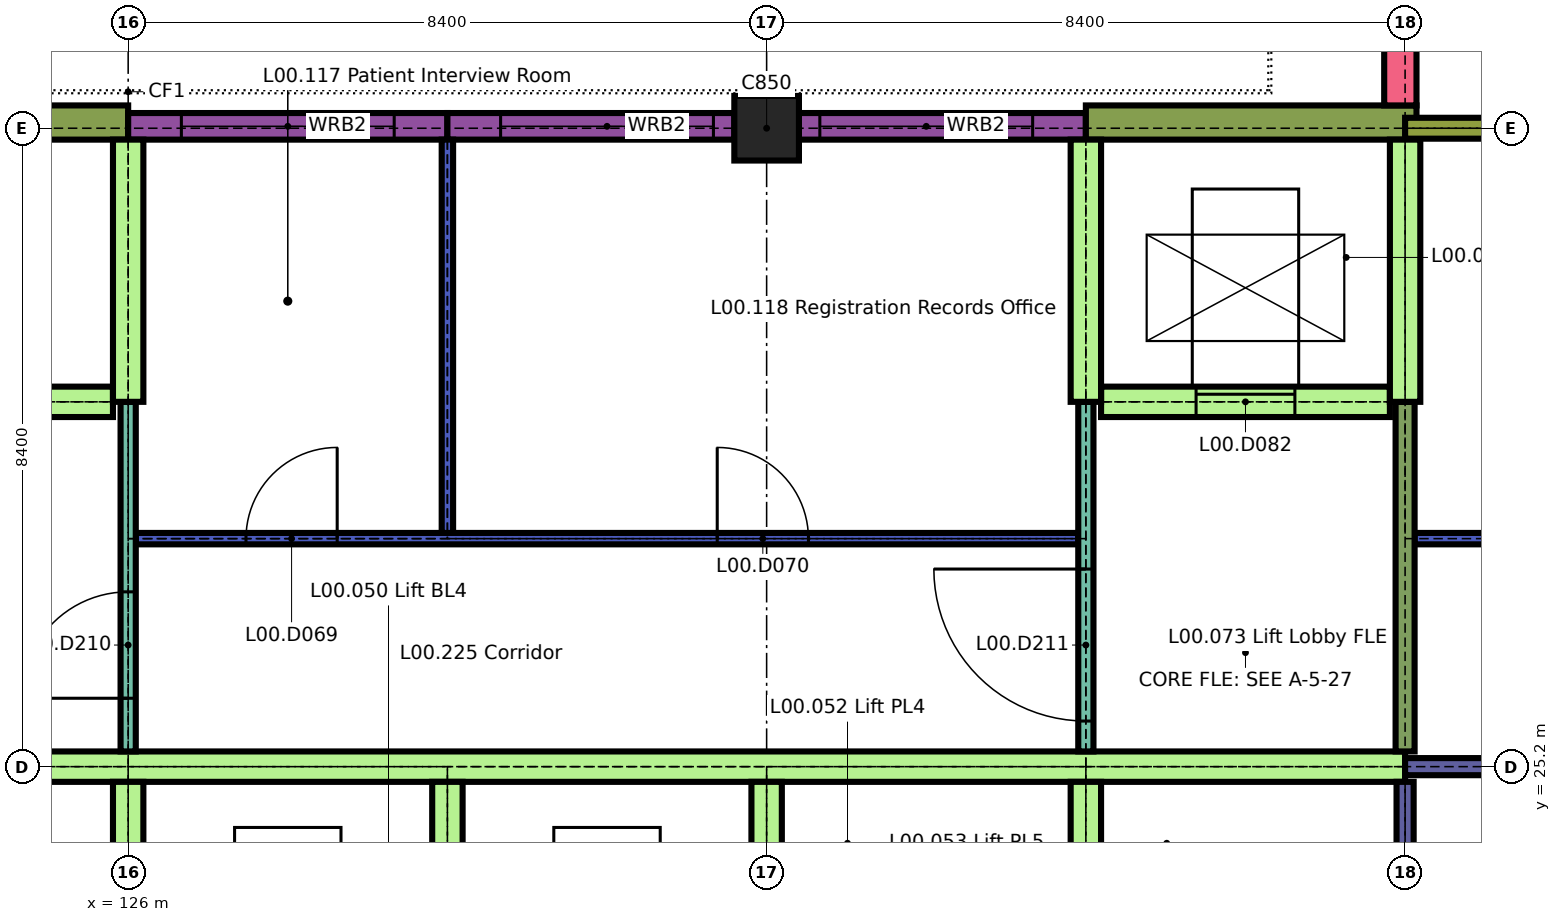
"""IFC4 building model, lengths in metres.
Left out: names, types, materials, properties, quantities, classifications, styles, units other than length and angle.
Written with IfcOpenShell. Run it as: python <this file> out.ifc"""

import sys

from ifc_helpers import new_model, si_unit, direction, frame, frame_2d, origin, origin_2d, place, context, subcontext, project, spatial, rectangle, extrude, element, fill, save


model = new_model("IFC4")
c1 = context("Model", 3, precision=1e-05, world=origin(), true_north=direction((0.0, 1.0)))
c2 = subcontext(c1, "Body", "Model", "MODEL_VIEW")
j1 = project(units=[si_unit("LENGTHUNIT", "METRE"), si_unit("PLANEANGLEUNIT", "RADIAN")], contexts=[c1])
p1 = place(None, origin())
s1 = spatial("IfcSite", under=j1, at=p1, CompositionType="ELEMENT")
p2 = place(p1, origin())
s2 = spatial("IfcBuilding", under=s1, at=p2, CompositionType="ELEMENT")
p3 = place(p2, origin())
s3 = spatial("IfcBuildingStorey", under=s2, at=p3, CompositionType="ELEMENT", Elevation=0.0)
p4 = place(p3, frame((134.4, 33.6, 0.0), z_axis=(0.0, 0.0, 1.0), x_axis=(1.0, 0.0, 0.0)))
e1 = element("IfcColumn", 1, at=p4, inside=s3, PredefinedType="COLUMN", context=c2, shape_type="SweptSolid", body=[
    extrude(rectangle(XDim=0.85, YDim=0.85, at=origin_2d()), origin(), (0.0, 0.0, 1.0), 4.14),
])
p5 = place(p3, frame((122.7, 33.675, 0.0), z_axis=(0.0, 0.0, 1.0), x_axis=(1.0, 0.0, 0.0)))
e2 = element("IfcWall", 2, at=p5, inside=s3, PredefinedType="SOLIDWALL", context=c2, shape_type="SweptSolid", body=[
    extrude(rectangle(XDim=3.3, YDim=0.45, at=frame_2d((1.65, 0.0))), origin(), (0.0, 0.0, 1.0), 4.14),
])
p6 = place(p3, frame((126.0, 33.625, 0.0), z_axis=(0.0, 0.0, 1.0), x_axis=(1.0, 0.0, 0.0)))
e3 = element("IfcWall", 3, at=p6, inside=s3, PredefinedType="SOLIDWALL", context=c2, shape_type="SweptSolid", body=[
    extrude(rectangle(XDim=4.2, YDim=0.35, at=frame_2d((2.1, 0.0))), origin(), (0.0, 0.0, 1.0), 3.84),
])
p7 = place(p6, frame((0.7, 0.0, 1.0)))
e4 = element("IfcOpeningElement", 4, at=p7, cuts=e3, PredefinedType="OPENING", context=c2, shape_type="SweptSolid", body=[
    extrude(rectangle(XDim=2.8, YDim=1.5, at=frame_2d((1.4, 0.75))), frame((0.0, 0.185, 0.0), z_axis=(0.0, -1.0, 0.0), x_axis=(1.0, 0.0, 0.0)), (0.0, 0.0, 1.0), 0.37),
])
p8 = place(p3, frame((130.2, 33.625, 0.0), z_axis=(0.0, 0.0, 1.0), x_axis=(1.0, 0.0, 0.0)))
e5 = element("IfcWall", 5, at=p8, inside=s3, PredefinedType="SOLIDWALL", context=c2, shape_type="SweptSolid", body=[
    extrude(rectangle(XDim=3.775, YDim=0.35, at=frame_2d((1.888, 0.0))), origin(), (0.0, 0.0, 1.0), 3.84),
])
p9 = place(p8, frame((0.7, 0.0, 1.0)))
e6 = element("IfcOpeningElement", 6, at=p9, cuts=e5, PredefinedType="OPENING", context=c2, shape_type="SweptSolid", body=[
    extrude(rectangle(XDim=2.8, YDim=1.5, at=frame_2d((1.4, 0.75))), frame((0.0, 0.185, 0.0), z_axis=(0.0, -1.0, 0.0), x_axis=(1.0, 0.0, 0.0)), (0.0, 0.0, 1.0), 0.37),
])
p10 = place(p3, frame((134.825, 33.625, 0.0), z_axis=(0.0, 0.0, 1.0), x_axis=(1.0, 0.0, 0.0)))
e7 = element("IfcWall", 7, at=p10, inside=s3, PredefinedType="SOLIDWALL", context=c2, shape_type="SweptSolid", body=[
    extrude(rectangle(XDim=3.775, YDim=0.35, at=frame_2d((1.888, 0.0))), origin(), (0.0, 0.0, 1.0), 3.84),
])
p11 = place(p10, frame((0.275, 0.0, 1.0)))
e8 = element("IfcOpeningElement", 8, at=p11, cuts=e7, PredefinedType="OPENING", context=c2, shape_type="SweptSolid", body=[
    extrude(rectangle(XDim=2.8, YDim=1.5, at=frame_2d((1.4, 0.75))), frame((0.0, 0.185, 0.0), z_axis=(0.0, -1.0, 0.0), x_axis=(1.0, 0.0, 0.0)), (0.0, 0.0, 1.0), 0.37),
])
p12 = place(p3, frame((138.6, 33.675, 0.0), z_axis=(0.0, 0.0, 1.0), x_axis=(1.0, 0.0, 0.0)))
e9 = element("IfcWall", 9, at=p12, inside=s3, PredefinedType="SOLIDWALL", context=c2, shape_type="SweptSolid", body=[
    extrude(rectangle(XDim=4.35, YDim=0.45, at=frame_2d((2.175, 0.0))), origin(), (0.0, 0.0, 1.0), 4.14),
])
p13 = place(p3, frame((142.738, 33.9, 0.0), z_axis=(0.0, 0.0, 1.0), x_axis=(0.0, 1.0, 0.0)))
e10 = element("IfcWall", 10, at=p13, inside=s3, PredefinedType="SOLIDWALL", context=c2, shape_type="SweptSolid", body=[
    extrude(rectangle(XDim=5.1, YDim=0.425, at=frame_2d((2.55, 0.0))), origin(), (0.0, 0.0, 1.0), 4.14),
])
p14 = place(p3, frame((117.6, 25.2, 0.0), z_axis=(0.0, 0.0, 1.0), x_axis=(1.0, 0.0, 0.0)))
e11 = element("IfcWall", 11, at=p14, inside=s3, PredefinedType="SHEAR", context=c2, shape_type="SweptSolid", body=[
    extrude(rectangle(XDim=25.2, YDim=0.4, at=frame_2d((12.6, 0.0))), origin(), (0.0, 0.0, 1.0), 4.14),
])
p15 = place(p3, frame((142.8, 25.2, 0.0), z_axis=(0.0, 0.0, 1.0), x_axis=(1.0, 0.0, 0.0)))
e12 = element("IfcWall", 12, at=p15, inside=s3, PredefinedType="SOLIDWALL", context=c2, shape_type="SweptSolid", body=[
    extrude(rectangle(XDim=7.975, YDim=0.225, at=frame_2d((3.987, 0.0))), origin(), (0.0, 0.0, 1.0), 4.14),
])
p16 = place(p15, frame((3.087, 0.0, 0.0)))
e13 = element("IfcOpeningElement", 13, at=p16, cuts=e12, PredefinedType="OPENING", context=c2, shape_type="SweptSolid", body=[
    extrude(rectangle(XDim=1.8, YDim=2.4, at=frame_2d((0.9, 1.2))), frame((0.0, 0.123, 0.0), z_axis=(0.0, -1.0, 0.0), x_axis=(1.0, 0.0, 0.0)), (0.0, 0.0, 1.0), 0.245),
])
p17 = place(p3, frame((126.1, 28.2, 0.0), z_axis=(0.0, 0.0, 1.0), x_axis=(1.0, 0.0, 0.0)))
e14 = element("IfcWall", 14, at=p17, inside=s3, PredefinedType="PARTITIONING", context=c2, shape_type="SweptSolid", body=[
    extrude(rectangle(XDim=12.4, YDim=0.15, at=frame_2d((6.2, 0.0))), origin(), (0.0, 0.0, 1.0), 4.14),
])
p18 = place(p17, frame((1.45, 0.0, 0.0)))
e15 = element("IfcOpeningElement", 15, at=p18, cuts=e14, PredefinedType="OPENING", context=c2, shape_type="SweptSolid", body=[
    extrude(rectangle(XDim=1.2, YDim=2.1, at=frame_2d((0.6, 1.05))), frame((0.0, 0.085, 0.0), z_axis=(0.0, -1.0, 0.0), x_axis=(1.0, 0.0, 0.0)), (0.0, 0.0, 1.0), 0.17),
])
p19 = place(p17, frame((7.65, 0.0, 0.0)))
e16 = element("IfcOpeningElement", 16, at=p19, cuts=e14, PredefinedType="OPENING", context=c2, shape_type="SweptSolid", body=[
    extrude(rectangle(XDim=1.2, YDim=2.1, at=frame_2d((0.6, 1.05))), frame((0.0, 0.085, 0.0), z_axis=(0.0, -1.0, 0.0), x_axis=(1.0, 0.0, 0.0)), (0.0, 0.0, 1.0), 0.17),
])
p20 = place(p3, frame((142.925, 28.2, 0.0), z_axis=(0.0, 0.0, 1.0), x_axis=(1.0, 0.0, 0.0)))
e17 = element("IfcWall", 17, at=p20, inside=s3, PredefinedType="PARTITIONING", context=c2, shape_type="SweptSolid", body=[
    extrude(rectangle(XDim=8.35, YDim=0.15, at=frame_2d((4.175, 0.0))), origin(), (0.0, 0.0, 1.0), 4.14),
])
p21 = place(p20, frame((3.538, 0.0, 0.0)))
e18 = element("IfcOpeningElement", 18, at=p21, cuts=e17, PredefinedType="OPENING", context=c2, shape_type="SweptSolid", body=[
    extrude(rectangle(XDim=1.2, YDim=2.1, at=frame_2d((0.6, 1.05))), frame((0.0, 0.085, 0.0), z_axis=(0.0, -1.0, 0.0), x_axis=(1.0, 0.0, 0.0)), (0.0, 0.0, 1.0), 0.17),
])
p22 = place(p3, frame((105.2, 30.0, 0.0), z_axis=(0.0, 0.0, 1.0), x_axis=(1.0, 0.0, 0.0)))
e19 = element("IfcWall", 19, at=p22, inside=s3, PredefinedType="SHEAR", context=c2, shape_type="SweptSolid", body=[
    extrude(rectangle(XDim=20.6, YDim=0.4, at=frame_2d((10.3, 0.0))), origin(), (0.0, 0.0, 1.0), 4.14),
])
p23 = place(p22, frame((1.35, 0.0, 0.0)))
e20 = element("IfcOpeningElement", 20, at=p23, cuts=e19, PredefinedType="OPENING", context=c2, shape_type="SweptSolid", body=[
    extrude(rectangle(XDim=1.3, YDim=2.1, at=frame_2d((0.65, 1.05))), frame((0.0, 0.21, 0.0), z_axis=(0.0, -1.0, 0.0), x_axis=(1.0, 0.0, 0.0)), (0.0, 0.0, 1.0), 0.42),
])
p24 = place(p22, frame((4.6, 0.0, 0.0)))
e21 = element("IfcOpeningElement", 21, at=p24, cuts=e19, PredefinedType="OPENING", context=c2, shape_type="SweptSolid", body=[
    extrude(rectangle(XDim=1.2, YDim=2.1, at=frame_2d((0.6, 1.05))), frame((0.0, 0.21, 0.0), z_axis=(0.0, -1.0, 0.0), x_axis=(1.0, 0.0, 0.0)), (0.0, 0.0, 1.0), 0.42),
])
p25 = place(p22, frame((13.0, 0.0, 0.0)))
e22 = element("IfcOpeningElement", 22, at=p25, cuts=e19, PredefinedType="OPENING", context=c2, shape_type="SweptSolid", body=[
    extrude(rectangle(XDim=1.2, YDim=2.1, at=frame_2d((0.6, 1.05))), frame((0.0, 0.21, 0.0), z_axis=(0.0, -1.0, 0.0), x_axis=(1.0, 0.0, 0.0)), (0.0, 0.0, 1.0), 0.42),
])
p26 = place(p3, frame((138.8, 30.0, 0.0), z_axis=(0.0, 0.0, 1.0), x_axis=(1.0, 0.0, 0.0)))
e23 = element("IfcWall", 23, at=p26, inside=s3, PredefinedType="SHEAR", context=c2, shape_type="SweptSolid", body=[
    extrude(rectangle(XDim=3.8, YDim=0.4, at=frame_2d((1.9, 0.0))), origin(), (0.0, 0.0, 1.0), 4.14),
])
p27 = place(p26, frame((1.25, 0.0, 0.0)))
e24 = element("IfcOpeningElement", 24, at=p27, cuts=e23, PredefinedType="OPENING", context=c2, shape_type="SweptSolid", body=[
    extrude(rectangle(XDim=1.3, YDim=2.1, at=frame_2d((0.65, 1.05))), frame((0.0, 0.21, 0.0), z_axis=(0.0, -1.0, 0.0), x_axis=(1.0, 0.0, 0.0)), (0.0, 0.0, 1.0), 0.42),
])
p28 = place(p3, frame((142.8, 33.6, 0.0), z_axis=(0.0, 0.0, 1.0), x_axis=(1.0, 0.0, 0.0)))
e25 = element("IfcWall", 25, at=p28, inside=s3, PredefinedType="SOLIDWALL", context=c2, shape_type="SweptSolid", body=[
    extrude(rectangle(XDim=7.975, YDim=0.275, at=frame_2d((3.987, 0.0))), origin(), (0.0, 0.0, 1.0), 4.14),
])
p29 = place(p28, frame((3.387, 0.0, 0.0)))
e26 = element("IfcOpeningElement", 26, at=p29, cuts=e25, PredefinedType="OPENING", context=c2, shape_type="SweptSolid", body=[
    extrude(rectangle(XDim=1.2, YDim=2.1, at=frame_2d((0.6, 1.05))), frame((0.0, 0.147, 0.0), z_axis=(0.0, -1.0, 0.0), x_axis=(1.0, 0.0, 0.0)), (0.0, 0.0, 1.0), 0.295),
])
p30 = place(p3, frame((126.0, 21.8, 0.0), z_axis=(0.0, 0.0, 1.0), x_axis=(0.0, 1.0, 0.0)))
e27 = element("IfcWall", 27, at=p30, inside=s3, PredefinedType="SHEAR", context=c2, shape_type="SweptSolid", body=[
    extrude(rectangle(XDim=3.2, YDim=0.4, at=frame_2d((1.6, 0.0))), origin(), (0.0, 0.0, 1.0), 4.14),
])
p31 = place(p3, frame((126.0, 25.4, 0.0), z_axis=(0.0, 0.0, 1.0), x_axis=(0.0, 1.0, 0.0)))
e28 = element("IfcWall", 28, at=p31, inside=s3, PredefinedType="PARTITIONING", context=c2, shape_type="SweptSolid", body=[
    extrude(rectangle(XDim=4.6, YDim=0.2, at=frame_2d((2.3, 0.0))), origin(), (0.0, 0.0, 1.0), 4.14),
])
p32 = place(p31, frame((0.7, 0.0, 0.0)))
e29 = element("IfcOpeningElement", 29, at=p32, cuts=e28, PredefinedType="OPENING", context=c2, shape_type="SweptSolid", body=[
    extrude(rectangle(XDim=1.4, YDim=2.1, at=frame_2d((0.7, 1.05))), frame((0.0, 0.11, 0.0), z_axis=(0.0, -1.0, 0.0), x_axis=(1.0, 0.0, 0.0)), (0.0, 0.0, 1.0), 0.22),
])
p33 = place(p3, frame((126.0, 30.0, 0.0), z_axis=(0.0, 0.0, 1.0), x_axis=(0.0, 1.0, 0.0)))
e30 = element("IfcWall", 30, at=p33, inside=s3, PredefinedType="SHEAR", context=c2, shape_type="SweptSolid", body=[
    extrude(rectangle(XDim=3.45, YDim=0.4, at=frame_2d((1.725, 0.0))), origin(), (0.0, 0.0, 1.0), 4.14),
])
p34 = place(p3, frame((130.2, 21.8, 0.0), z_axis=(0.0, 0.0, 1.0), x_axis=(0.0, 1.0, 0.0)))
e31 = element("IfcWall", 31, at=p34, inside=s3, PredefinedType="SHEAR", context=c2, shape_type="SweptSolid", body=[
    extrude(rectangle(XDim=3.2, YDim=0.4, at=frame_2d((1.6, 0.0))), origin(), (0.0, 0.0, 1.0), 4.14),
])
p35 = place(p3, frame((130.2, 28.275, 0.0), z_axis=(0.0, 0.0, 1.0), x_axis=(0.0, 1.0, 0.0)))
e32 = element("IfcWall", 32, at=p35, inside=s3, PredefinedType="PARTITIONING", context=c2, shape_type="SweptSolid", body=[
    extrude(rectangle(XDim=5.175, YDim=0.15, at=frame_2d((2.587, 0.0))), origin(), (0.0, 0.0, 1.0), 4.14),
])
for number, where, z_axis, x_axis in (
    (33, (134.4, 21.8, 0.0), (0.0, 0.0, 1.0), (0.0, 1.0, 0.0)),
    (34, (138.6, 21.8, 0.0), (0.0, 0.0, 1.0), (0.0, 1.0, 0.0)),
):
    element("IfcWall", number, at=place(p3, frame(where, z_axis=z_axis, x_axis=x_axis)), inside=s3, PredefinedType="SHEAR", context=c2, shape_type="SweptSolid", body=[
        extrude(rectangle(XDim=3.2, YDim=0.4, at=frame_2d((1.6, 0.0))), origin(), (0.0, 0.0, 1.0), 4.14),
    ])
p36 = place(p3, frame((138.6, 25.4, 0.0), z_axis=(0.0, 0.0, 1.0), x_axis=(0.0, 1.0, 0.0)))
e35 = element("IfcWall", 35, at=p36, inside=s3, PredefinedType="PARTITIONING", context=c2, shape_type="SweptSolid", body=[
    extrude(rectangle(XDim=4.6, YDim=0.2, at=frame_2d((2.3, 0.0))), origin(), (0.0, 0.0, 1.0), 4.14),
])
p37 = place(p36, frame((0.4, 0.0, 0.0)))
e36 = element("IfcOpeningElement", 36, at=p37, cuts=e35, PredefinedType="OPENING", context=c2, shape_type="SweptSolid", body=[
    extrude(rectangle(XDim=2.0, YDim=2.4, at=frame_2d((1.0, 1.2))), frame((0.0, 0.11, 0.0), z_axis=(0.0, -1.0, 0.0), x_axis=(1.0, 0.0, 0.0)), (0.0, 0.0, 1.0), 0.22),
])
p38 = place(p3, frame((138.6, 30.0, 0.0), z_axis=(0.0, 0.0, 1.0), x_axis=(0.0, 1.0, 0.0)))
e37 = element("IfcWall", 37, at=p38, inside=s3, PredefinedType="SHEAR", context=c2, shape_type="SweptSolid", body=[
    extrude(rectangle(XDim=3.45, YDim=0.4, at=frame_2d((1.725, 0.0))), origin(), (0.0, 0.0, 1.0), 4.14),
])
p39 = place(p3, frame((142.8, 17.1, 0.0), z_axis=(0.0, 0.0, 1.0), x_axis=(0.0, 1.0, 0.0)))
e38 = element("IfcWall", 38, at=p39, inside=s3, PredefinedType="SOLIDWALL", context=c2, shape_type="SweptSolid", body=[
    extrude(rectangle(XDim=7.9, YDim=0.225, at=frame_2d((3.95, 0.0))), origin(), (0.0, 0.0, 1.0), 4.14),
])
p40 = place(p3, frame((142.8, 25.4, 0.0), z_axis=(0.0, 0.0, 1.0), x_axis=(0.0, 1.0, 0.0)))
e39 = element("IfcWall", 39, at=p40, inside=s3, PredefinedType="SOLIDWALL", context=c2, shape_type="SweptSolid", body=[
    extrude(rectangle(XDim=4.6, YDim=0.25, at=frame_2d((2.3, 0.0))), origin(), (0.0, 0.0, 1.0), 4.14),
])
p41 = place(p3, frame((142.8, 30.0, 0.0), z_axis=(0.0, 0.0, 1.0), x_axis=(0.0, 1.0, 0.0)))
e40 = element("IfcWall", 40, at=p41, inside=s3, PredefinedType="SHEAR", context=c2, shape_type="SweptSolid", body=[
    extrude(rectangle(XDim=3.45, YDim=0.4, at=frame_2d((1.725, 0.0))), origin(), (0.0, 0.0, 1.0), 4.14),
])
p42 = place(p7, origin())
e41 = element("IfcWindow", 41, at=p42, inside=s3, PartitioningType="DOUBLE_PANEL_VERTICAL", PredefinedType="WINDOW", context=c2, shape_type="SweptSolid", body=[
    extrude(rectangle(XDim=2.8, YDim=1.5, at=frame_2d((1.4, 0.75))), frame((0.0, 0.03, 0.0), z_axis=(0.0, -1.0, 0.0), x_axis=(1.0, 0.0, 0.0)), (0.0, 0.0, 1.0), 0.06),
])
fill(e4, e41)
p43 = place(p9, origin())
e42 = element("IfcWindow", 42, at=p43, inside=s3, PartitioningType="DOUBLE_PANEL_VERTICAL", PredefinedType="WINDOW", context=c2, shape_type="SweptSolid", body=[
    extrude(rectangle(XDim=2.8, YDim=1.5, at=frame_2d((1.4, 0.75))), frame((0.0, 0.03, 0.0), z_axis=(0.0, -1.0, 0.0), x_axis=(1.0, 0.0, 0.0)), (0.0, 0.0, 1.0), 0.06),
])
fill(e6, e42)
p44 = place(p11, origin())
e43 = element("IfcWindow", 43, at=p44, inside=s3, PartitioningType="DOUBLE_PANEL_VERTICAL", PredefinedType="WINDOW", context=c2, shape_type="SweptSolid", body=[
    extrude(rectangle(XDim=2.8, YDim=1.5, at=frame_2d((1.4, 0.75))), frame((0.0, 0.03, 0.0), z_axis=(0.0, -1.0, 0.0), x_axis=(1.0, 0.0, 0.0)), (0.0, 0.0, 1.0), 0.06),
])
fill(e8, e43)
p45 = place(p18, origin())
e44 = element("IfcDoor", 44, at=p45, inside=s3, OperationType="SINGLE_SWING_LEFT", PredefinedType="DOOR", context=c2, shape_type="SweptSolid", body=[
    extrude(rectangle(XDim=1.2, YDim=2.1, at=frame_2d((0.6, 1.05))), frame((0.0, 0.025, 0.0), z_axis=(0.0, -1.0, 0.0), x_axis=(1.0, 0.0, 0.0)), (0.0, 0.0, 1.0), 0.05),
])
fill(e15, e44)
p46 = place(p19, origin())
e45 = element("IfcDoor", 45, at=p46, inside=s3, OperationType="SINGLE_SWING_RIGHT", PredefinedType="DOOR", context=c2, shape_type="SweptSolid", body=[
    extrude(rectangle(XDim=1.2, YDim=2.1, at=frame_2d((0.6, 1.05))), frame((0.0, 0.025, 0.0), z_axis=(0.0, -1.0, 0.0), x_axis=(1.0, 0.0, 0.0)), (0.0, 0.0, 1.0), 0.05),
])
fill(e16, e45)
p47 = place(p27, origin())
e46 = element("IfcDoor", 46, at=p47, inside=s3, OperationType="SLIDING_TO_LEFT", PredefinedType="DOOR", context=c2, shape_type="SweptSolid", body=[
    extrude(rectangle(XDim=1.3, YDim=2.1, at=frame_2d((0.65, 1.05))), frame((0.0, 0.025, 0.0), z_axis=(0.0, -1.0, 0.0), x_axis=(1.0, 0.0, 0.0)), (0.0, 0.0, 1.0), 0.05),
])
fill(e24, e46)
p48 = place(p32, origin())
e47 = element("IfcDoor", 47, at=p48, inside=s3, OperationType="SINGLE_SWING_RIGHT", PredefinedType="DOOR", context=c2, shape_type="SweptSolid", body=[
    extrude(rectangle(XDim=1.4, YDim=2.1, at=frame_2d((0.7, 1.05))), frame((0.0, 0.03, 0.0), z_axis=(0.0, -1.0, 0.0), x_axis=(1.0, 0.0, 0.0)), (0.0, 0.0, 1.0), 0.06),
])
fill(e29, e47)
p49 = place(p37, origin())
e48 = element("IfcDoor", 48, at=p49, inside=s3, OperationType="SINGLE_SWING_LEFT", PredefinedType="DOOR", context=c2, shape_type="SweptSolid", body=[
    extrude(rectangle(XDim=2.0, YDim=2.4, at=frame_2d((1.0, 1.2))), frame((0.0, 0.03, 0.0), z_axis=(0.0, -1.0, 0.0), x_axis=(1.0, 0.0, 0.0)), (0.0, 0.0, 1.0), 0.06),
])
fill(e36, e48)
save(model, sys.argv[1])
